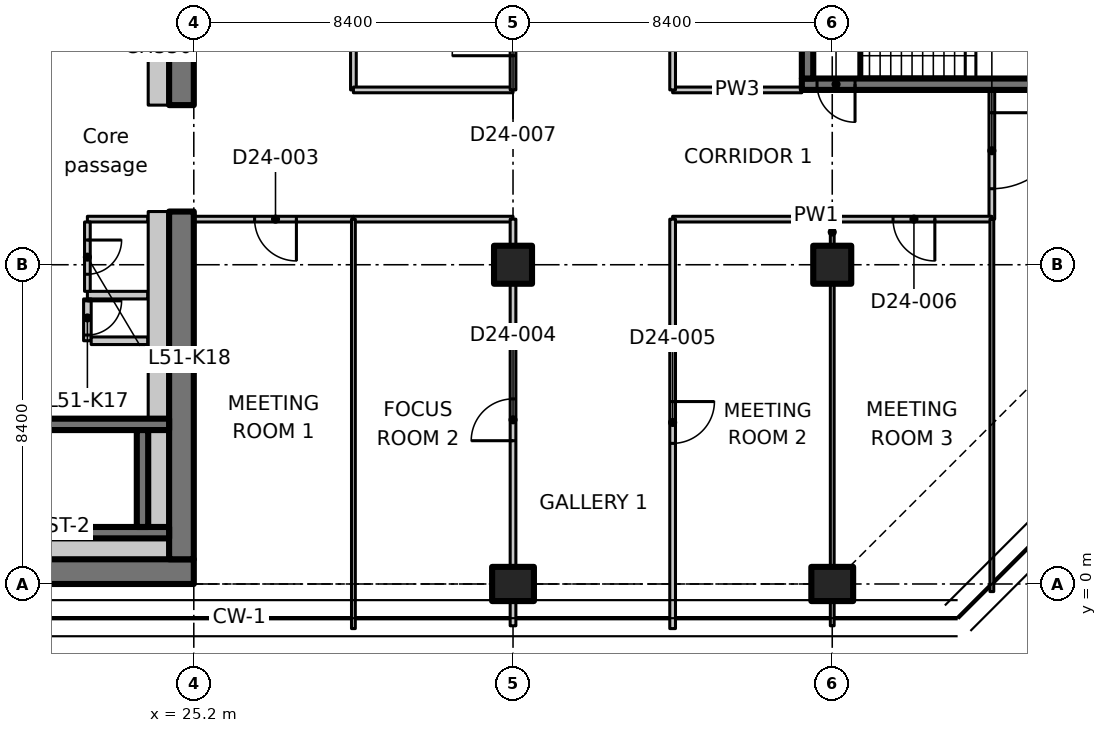
"""IFC4 building model, lengths in metres.
Left out: names, types, materials, properties, quantities, classifications, styles, units other than length and angle.
Written with IfcOpenShell. Run it as: python <this file> out.ifc"""

import sys

from ifc_helpers import new_model, si_unit, direction, frame, frame_2d, origin, origin_2d, place, context, subcontext, project, spatial, polyline, rectangle, outline, extrude, element, fill, save


model = new_model("IFC4")
c1 = context("Model", 3, precision=1e-05, world=origin(), true_north=direction((0.0, 1.0)))
c2 = subcontext(c1, "Body", "Model", "MODEL_VIEW")
j1 = project(units=[si_unit("LENGTHUNIT", "METRE"), si_unit("PLANEANGLEUNIT", "RADIAN")], contexts=[c1])
p1 = place(None, origin())
s1 = spatial("IfcSite", under=j1, at=p1, CompositionType="ELEMENT")
p2 = place(p1, origin())
s2 = spatial("IfcBuilding", under=s1, at=p2, CompositionType="ELEMENT")
p3 = place(p2, frame((0.0, 0.0, 202.8)))
s3 = spatial("IfcBuildingStorey", under=s2, at=p3, CompositionType="ELEMENT", Elevation=202.8)
p4 = place(p3, frame((33.6, 0.0, 0.0), z_axis=(0.0, 0.0, 1.0), x_axis=(0.0, 1.0, 0.0)))
e1 = element("IfcColumn", 1, at=p4, inside=s3, PredefinedType="COLUMN", context=c2, shape_type="SweptSolid", body=[
    extrude(rectangle(XDim=0.9, YDim=1.1, at=origin_2d()), origin(), (0.0, 0.0, 1.0), 3.3),
])
p5 = place(p3, frame((33.6, 8.4, 0.0), z_axis=(0.0, 0.0, 1.0), x_axis=(1.0, 0.0, 0.0)))
e2 = element("IfcColumn", 2, at=p5, inside=s3, PredefinedType="COLUMN", context=c2, shape_type="SweptSolid", body=[
    extrude(rectangle(XDim=1.0, YDim=1.0, at=origin_2d()), origin(), (0.0, 0.0, 1.0), 3.3),
])
p6 = place(p3, frame((42.0, 0.0, 0.0), z_axis=(0.0, 0.0, 1.0), x_axis=(0.0, 1.0, 0.0)))
e3 = element("IfcColumn", 3, at=p6, inside=s3, PredefinedType="COLUMN", context=c2, shape_type="SweptSolid", body=[
    extrude(rectangle(XDim=0.9, YDim=1.1, at=origin_2d()), origin(), (0.0, 0.0, 1.0), 3.3),
])
p7 = place(p3, frame((42.0, 8.4, 0.0), z_axis=(0.0, 0.0, 1.0), x_axis=(1.0, 0.0, 0.0)))
e4 = element("IfcColumn", 4, at=p7, inside=s3, PredefinedType="COLUMN", context=c2, shape_type="SweptSolid", body=[
    extrude(rectangle(XDim=1.0, YDim=1.0, at=origin_2d()), origin(), (0.0, 0.0, 1.0), 3.3),
])
p8 = place(p3, frame((7.286, 0.325, 0.0), z_axis=(0.0, 0.0, 1.0), x_axis=(1.0, 0.0, 0.0)))
e5 = element("IfcWall", 5, at=p8, inside=s3, PredefinedType="SHEAR", context=c2, shape_type="SweptSolid", body=[
    extrude(rectangle(XDim=17.914, YDim=0.65, at=frame_2d((8.957, 0.0))), origin(), (0.0, 0.0, 1.0), 3.3),
])
p9 = place(p3, frame((24.875, 0.65, 0.0), z_axis=(0.0, 0.0, 1.0), x_axis=(0.0, 1.0, 0.0)))
e6 = element("IfcWall", 6, at=p9, inside=s3, PredefinedType="SHEAR", context=c2, shape_type="SweptSolid", body=[
    extrude(rectangle(XDim=9.15, YDim=0.65, at=frame_2d((4.575, 0.0))), origin(), (0.0, 0.0, 1.0), 3.3),
])
p10 = place(p3, frame((24.875, 12.6, 0.0), z_axis=(0.0, 0.0, 1.0), x_axis=(0.0, 1.0, 0.0)))
e7 = element("IfcWall", 7, at=p10, inside=s3, PredefinedType="SHEAR", context=c2, shape_type="SweptSolid", body=[
    extrude(rectangle(XDim=3.55, YDim=0.65, at=frame_2d((1.775, 0.0))), origin(), (0.0, 0.0, 1.0), 3.3),
])
p11 = place(p3, frame((24.275, 12.6, 0.0), z_axis=(0.0, 0.0, 1.0), x_axis=(0.0, 1.0, 0.0)))
e8 = element("IfcWall", 8, at=p11, inside=s3, PredefinedType="PARTITIONING", context=c2, shape_type="SweptSolid", body=[
    extrude(rectangle(XDim=3.0, YDim=0.55, at=frame_2d((1.5, 0.0))), origin(), (0.0, 0.0, 1.0), 3.3),
])
p12 = place(p3, frame((15.8, 1.35, 0.0), z_axis=(0.0, 0.0, 1.0), x_axis=(1.0, 0.0, 0.0)))
e9 = element("IfcWall", 9, at=p12, inside=s3, PredefinedType="SHEAR", context=c2, shape_type="SweptSolid", body=[
    extrude(rectangle(XDim=8.75, YDim=0.3, at=frame_2d((4.375, 0.0))), origin(), (0.0, 0.0, 1.0), 3.3),
])
p13 = place(p3, frame((15.8, 4.2, 0.0), z_axis=(0.0, 0.0, 1.0), x_axis=(1.0, 0.0, 0.0)))
e10 = element("IfcWall", 10, at=p13, inside=s3, PredefinedType="SHEAR", context=c2, shape_type="SweptSolid", body=[
    extrude(rectangle(XDim=8.75, YDim=0.3, at=frame_2d((4.375, 0.0))), origin(), (0.0, 0.0, 1.0), 3.3),
])
p14 = place(p13, frame((0.4, 0.0, 0.0)))
e11 = element("IfcOpeningElement", 11, at=p14, cuts=e10, PredefinedType="OPENING", context=c2, shape_type="SweptSolid", body=[
    extrude(rectangle(XDim=1.0, YDim=2.1, at=frame_2d((0.5, 1.05))), frame((0.0, 0.16, 0.0), z_axis=(0.0, -1.0, 0.0), x_axis=(1.0, 0.0, 0.0)), (0.0, 0.0, 1.0), 0.32),
])
p15 = place(p3, frame((23.85, 1.5, 0.0), z_axis=(0.0, 0.0, 1.0), x_axis=(0.0, 1.0, 0.0)))
e12 = element("IfcWall", 12, at=p15, inside=s3, PredefinedType="SHEAR", context=c2, shape_type="SweptSolid", body=[
    extrude(rectangle(XDim=2.55, YDim=0.3, at=frame_2d((1.275, 0.0))), origin(), (0.0, 0.0, 1.0), 3.3),
])
p16 = place(p3, frame((49.4, 13.15, 0.0), z_axis=(0.0, 0.0, 1.0), x_axis=(-1.0, 0.0, 0.0)))
e13 = element("IfcWall", 13, at=p16, inside=s3, PredefinedType="SHEAR", context=c2, shape_type="SweptSolid", body=[
    extrude(rectangle(XDim=8.2, YDim=0.3, at=frame_2d((4.1, 0.0))), origin(), (0.0, 0.0, 1.0), 3.3),
])
p17 = place(p16, frame((6.8, 0.0, 0.0)))
e14 = element("IfcOpeningElement", 14, at=p17, cuts=e13, PredefinedType="OPENING", context=c2, shape_type="SweptSolid", body=[
    extrude(rectangle(XDim=1.0, YDim=2.1, at=frame_2d((0.5, 1.05))), frame((0.0, 0.16, 0.0), z_axis=(0.0, -1.0, 0.0), x_axis=(1.0, 0.0, 0.0)), (0.0, 0.0, 1.0), 0.32),
])
p18 = place(p3, frame((41.35, 13.3, 0.0), z_axis=(0.0, 0.0, 1.0), x_axis=(0.0, 1.0, 0.0)))
e15 = element("IfcWall", 15, at=p18, inside=s3, PredefinedType="SHEAR", context=c2, shape_type="SweptSolid", body=[
    extrude(rectangle(XDim=2.55, YDim=0.3, at=frame_2d((1.275, 0.0))), origin(), (0.0, 0.0, 1.0), 3.3),
])
p19 = place(p3, frame((23.988, 7.6, 0.0), z_axis=(0.0, 0.0, 1.0), x_axis=(-1.0, 0.0, 0.0)))
e16 = element("IfcWall", 16, at=p19, inside=s3, PredefinedType="PARTITIONING", context=c2, shape_type="SweptSolid", body=[
    extrude(rectangle(XDim=1.588, YDim=0.2, at=frame_2d((0.794, 0.0))), origin(), (0.0, 0.0, 1.0), 3.3),
])
p20 = place(p3, frame((22.4, 7.5, 0.0), z_axis=(0.0, 0.0, 1.0), x_axis=(0.0, -1.0, 0.0)))
e17 = element("IfcWall", 17, at=p20, inside=s3, PredefinedType="PARTITIONING", context=c2, shape_type="SweptSolid", body=[
    extrude(rectangle(XDim=1.1, YDim=0.2, at=frame_2d((0.55, 0.0))), origin(), (0.0, 0.0, 1.0), 3.3),
])
p21 = place(p20, frame((0.05, 0.0, 0.0)))
e18 = element("IfcOpeningElement", 18, at=p21, cuts=e17, PredefinedType="OPENING", context=c2, shape_type="SweptSolid", body=[
    extrude(rectangle(XDim=0.9, YDim=2.1, at=frame_2d((0.45, 1.05))), frame((0.0, 0.11, 0.0), z_axis=(0.0, -1.0, 0.0), x_axis=(1.0, 0.0, 0.0)), (0.0, 0.0, 1.0), 0.22),
])
p22 = place(p3, frame((22.5, 6.4, 0.0), z_axis=(0.0, 0.0, 1.0), x_axis=(1.0, 0.0, 0.0)))
e19 = element("IfcWall", 19, at=p22, inside=s3, PredefinedType="PARTITIONING", context=c2, shape_type="SweptSolid", body=[
    extrude(rectangle(XDim=1.488, YDim=0.2, at=frame_2d((0.744, 0.0))), origin(), (0.0, 0.0, 1.0), 3.3),
])
p23 = place(p3, frame((23.988, 9.6, 0.0), z_axis=(0.0, 0.0, 1.0), x_axis=(-1.0, 0.0, 0.0)))
e20 = element("IfcWall", 20, at=p23, inside=s3, PredefinedType="PARTITIONING", context=c2, shape_type="SweptSolid", body=[
    extrude(rectangle(XDim=1.588, YDim=0.15, at=frame_2d((0.794, 0.0))), origin(), (0.0, 0.0, 1.0), 3.3),
])
p24 = place(p3, frame((22.4, 9.525, 0.0), z_axis=(0.0, 0.0, 1.0), x_axis=(0.0, -1.0, 0.0)))
e21 = element("IfcWall", 21, at=p24, inside=s3, PredefinedType="PARTITIONING", context=c2, shape_type="SweptSolid", body=[
    extrude(rectangle(XDim=1.825, YDim=0.15, at=frame_2d((0.913, 0.0))), origin(), (0.0, 0.0, 1.0), 3.3),
])
p25 = place(p24, frame((0.475, 0.0, 0.0)))
e22 = element("IfcOpeningElement", 22, at=p25, cuts=e21, PredefinedType="OPENING", context=c2, shape_type="SweptSolid", body=[
    extrude(rectangle(XDim=0.9, YDim=2.1, at=frame_2d((0.45, 1.05))), frame((0.0, 0.085, 0.0), z_axis=(0.0, -1.0, 0.0), x_axis=(1.0, 0.0, 0.0)), (0.0, 0.0, 1.0), 0.17),
])
p26 = place(p3, frame((13.35, 0.925, 0.0), z_axis=(0.0, 0.0, 1.0), x_axis=(1.0, 0.0, 0.0)))
e23 = element("IfcWall", 23, at=p26, inside=s3, PredefinedType="PARTITIONING", context=c2, shape_type="SweptSolid", body=[
    extrude(rectangle(XDim=11.2, YDim=0.55, at=frame_2d((5.6, 0.0))), origin(), (0.0, 0.0, 1.0), 3.3),
])
p27 = place(p3, frame((24.275, 1.5, 0.0), z_axis=(0.0, 0.0, 1.0), x_axis=(0.0, 1.0, 0.0)))
e24 = element("IfcWall", 24, at=p27, inside=s3, PredefinedType="PARTITIONING", context=c2, shape_type="SweptSolid", body=[
    extrude(rectangle(XDim=2.55, YDim=0.55, at=frame_2d((1.275, 0.0))), origin(), (0.0, 0.0, 1.0), 3.3),
])
p28 = place(p3, frame((24.275, 4.35, 0.0), z_axis=(0.0, 0.0, 1.0), x_axis=(0.0, 1.0, 0.0)))
e25 = element("IfcWall", 25, at=p28, inside=s3, PredefinedType="PARTITIONING", context=c2, shape_type="SweptSolid", body=[
    extrude(rectangle(XDim=5.45, YDim=0.55, at=frame_2d((2.725, 0.0))), origin(), (0.0, 0.0, 1.0), 3.3),
])
p29 = place(p3, frame((29.4, 9.6, 0.0), z_axis=(0.0, 0.0, 1.0), x_axis=(-1.0, 0.0, 0.0)))
e26 = element("IfcWall", 26, at=p29, inside=s3, PredefinedType="PARTITIONING", context=c2, shape_type="SweptSolid", body=[
    extrude(rectangle(XDim=4.2, YDim=0.15, at=frame_2d((2.1, 0.0))), origin(), (0.0, 0.0, 1.0), 3.28),
])
p30 = place(p29, frame((1.5, 0.0, 0.0)))
e27 = element("IfcOpeningElement", 27, at=p30, cuts=e26, PredefinedType="OPENING", context=c2, shape_type="SweptSolid", body=[
    extrude(rectangle(XDim=1.1, YDim=2.1, at=frame_2d((0.55, 1.05))), frame((0.0, 0.085, 0.0), z_axis=(0.0, -1.0, 0.0), x_axis=(1.0, 0.0, 0.0)), (0.0, 0.0, 1.0), 0.17),
])
p31 = place(p3, frame((29.4, 21.2, 0.0), z_axis=(0.0, 0.0, 1.0), x_axis=(0.0, -1.0, 0.0)))
e28 = element("IfcWall", 28, at=p31, inside=s3, PredefinedType="PARTITIONING", context=c2, shape_type="SweptSolid", body=[
    extrude(rectangle(XDim=8.2, YDim=0.15, at=frame_2d((4.1, 0.0))), origin(), (0.0, 0.0, 1.0), 3.28),
])
p32 = place(p3, frame((46.2, 13.0, 0.0), z_axis=(0.0, 0.0, 1.0), x_axis=(0.0, -1.0, 0.0)))
e29 = element("IfcWall", 29, at=p32, inside=s3, PredefinedType="PARTITIONING", context=c2, shape_type="SweptSolid", body=[
    extrude(rectangle(XDim=3.4, YDim=0.15, at=frame_2d((1.7, 0.0))), origin(), (0.0, 0.0, 1.0), 3.28),
])
p33 = place(p32, frame((0.6, 0.0, 0.0)))
e30 = element("IfcOpeningElement", 30, at=p33, cuts=e29, PredefinedType="OPENING", context=c2, shape_type="SweptSolid", body=[
    extrude(rectangle(XDim=2.0, YDim=2.4, at=frame_2d((1.0, 1.2))), frame((0.0, 0.085, 0.0), z_axis=(0.0, -1.0, 0.0), x_axis=(1.0, 0.0, 0.0)), (0.0, 0.0, 1.0), 0.17),
])
p34 = place(p3, frame((33.6, 9.6, 0.0), z_axis=(0.0, 0.0, 1.0), x_axis=(-1.0, 0.0, 0.0)))
e31 = element("IfcWall", 31, at=p34, inside=s3, PredefinedType="PARTITIONING", context=c2, shape_type="SweptSolid", body=[
    extrude(rectangle(XDim=4.2, YDim=0.15, at=frame_2d((2.1, 0.0))), origin(), (0.0, 0.0, 1.0), 3.28),
])
p35 = place(p3, frame((42.0, 9.6, 0.0), z_axis=(0.0, 0.0, 1.0), x_axis=(-1.0, 0.0, 0.0)))
e32 = element("IfcWall", 32, at=p35, inside=s3, PredefinedType="PARTITIONING", context=c2, shape_type="SweptSolid", body=[
    extrude(rectangle(XDim=4.2, YDim=0.15, at=frame_2d((2.1, 0.0))), origin(), (0.0, 0.0, 1.0), 3.28),
])
p36 = place(p3, frame((46.2, 9.6, 0.0), z_axis=(0.0, 0.0, 1.0), x_axis=(-1.0, 0.0, 0.0)))
e33 = element("IfcWall", 33, at=p36, inside=s3, PredefinedType="PARTITIONING", context=c2, shape_type="SweptSolid", body=[
    extrude(rectangle(XDim=4.2, YDim=0.15, at=frame_2d((2.1, 0.0))), origin(), (0.0, 0.0, 1.0), 3.28),
])
p37 = place(p36, frame((1.5, 0.0, 0.0)))
e34 = element("IfcOpeningElement", 34, at=p37, cuts=e33, PredefinedType="OPENING", context=c2, shape_type="SweptSolid", body=[
    extrude(rectangle(XDim=1.1, YDim=2.1, at=frame_2d((0.55, 1.05))), frame((0.0, 0.085, 0.0), z_axis=(0.0, -1.0, 0.0), x_axis=(1.0, 0.0, 0.0)), (0.0, 0.0, 1.0), 0.17),
])
p38 = place(p3, frame((29.4, 13.0, 0.0), z_axis=(0.0, 0.0, 1.0), x_axis=(1.0, 0.0, 0.0)))
e35 = element("IfcWall", 35, at=p38, inside=s3, PredefinedType="PARTITIONING", context=c2, shape_type="SweptSolid", body=[
    extrude(rectangle(XDim=4.2, YDim=0.15, at=frame_2d((2.1, 0.0))), origin(), (0.0, 0.0, 1.0), 3.28),
])
p39 = place(p3, frame((37.8, 13.0, 0.0), z_axis=(0.0, 0.0, 1.0), x_axis=(1.0, 0.0, 0.0)))
e36 = element("IfcWall", 36, at=p39, inside=s3, PredefinedType="PARTITIONING", context=c2, shape_type="SweptSolid", body=[
    extrude(rectangle(XDim=3.4, YDim=0.15, at=frame_2d((1.7, 0.0))), origin(), (0.0, 0.0, 1.0), 3.28),
])
p40 = place(p3, frame((46.2, -0.2, 0.0), z_axis=(0.0, 0.0, 1.0), x_axis=(0.0, 1.0, 0.0)))
e37 = element("IfcWall", 37, at=p40, inside=s3, PredefinedType="PARTITIONING", context=c2, shape_type="SweptSolid", body=[
    extrude(outline(polyline([(0.0, 0.0), (9.8, 0.0), (9.8, 3.28), (5.066, 3.28), (5.064, 2.93), (3.736, 2.93), (3.734, 3.28), (0.0, 3.28), (0.0, 0.0)])), frame((0.0, 0.05, 0.0), z_axis=(0.0, -1.0, 0.0), x_axis=(1.0, 0.0, 0.0)), (0.0, 0.0, 1.0), 0.1),
])
p41 = place(p3, frame((33.6, -1.1, 0.0), z_axis=(0.0, 0.0, 1.0), x_axis=(0.0, 1.0, 0.0)))
e38 = element("IfcWall", 38, at=p41, inside=s3, PredefinedType="PARTITIONING", context=c2, shape_type="SweptSolid", body=[
    extrude(rectangle(XDim=0.63, YDim=0.15, at=frame_2d((0.315, 0.0))), origin(), (0.0, 0.0, 1.0), 3.28),
])
p42 = place(p3, frame((33.6, 0.47, 0.0), z_axis=(0.0, 0.0, 1.0), x_axis=(0.0, 1.0, 0.0)))
e39 = element("IfcWall", 39, at=p42, inside=s3, PredefinedType="PARTITIONING", context=c2, shape_type="SweptSolid", body=[
    extrude(rectangle(XDim=7.41, YDim=0.15, at=frame_2d((3.705, 0.0))), origin(), (0.0, 0.0, 1.0), 3.28),
])
p43 = place(p42, frame((3.3, 0.0, 0.0)))
e40 = element("IfcOpeningElement", 40, at=p43, cuts=e39, PredefinedType="OPENING", context=c2, shape_type="SweptSolid", body=[
    extrude(rectangle(XDim=1.1, YDim=2.1, at=frame_2d((0.55, 1.05))), frame((0.0, 0.085, 0.0), z_axis=(0.0, -1.0, 0.0), x_axis=(1.0, 0.0, 0.0)), (0.0, 0.0, 1.0), 0.17),
])
p44 = place(p3, frame((33.6, 8.92, 0.0), z_axis=(0.0, 0.0, 1.0), x_axis=(0.0, 1.0, 0.0)))
e41 = element("IfcWall", 41, at=p44, inside=s3, PredefinedType="PARTITIONING", context=c2, shape_type="SweptSolid", body=[
    extrude(rectangle(XDim=0.68, YDim=0.15, at=frame_2d((0.34, 0.0))), origin(), (0.0, 0.0, 1.0), 3.28),
])
p45 = place(p3, frame((37.8, 9.6, 0.0), z_axis=(0.0, 0.0, 1.0), x_axis=(0.0, -1.0, 0.0)))
e42 = element("IfcWall", 42, at=p45, inside=s3, PredefinedType="PARTITIONING", context=c2, shape_type="SweptSolid", body=[
    extrude(outline(polyline([(0.0, 0.0), (10.774, 0.0), (10.774, 3.28), (10.7, 3.28), (10.05, 3.28), (10.048, 2.93), (9.152, 2.93), (9.15, 3.28), (0.0, 3.28), (0.0, 0.0)])), frame((0.0, 0.075, 0.0), z_axis=(0.0, -1.0, 0.0), x_axis=(1.0, 0.0, 0.0)), (0.0, 0.0, 1.0), 0.15),
])
p46 = place(p45, frame((4.8, 0.0, 0.0)))
e43 = element("IfcOpeningElement", 43, at=p46, cuts=e42, PredefinedType="OPENING", context=c2, shape_type="SweptSolid", body=[
    extrude(rectangle(XDim=1.1, YDim=2.1, at=frame_2d((0.55, 1.05))), frame((0.0, 0.085, 0.0), z_axis=(0.0, -1.0, 0.0), x_axis=(1.0, 0.0, 0.0)), (0.0, 0.0, 1.0), 0.17),
])
p47 = place(p3, frame((29.4, 9.6, 0.0), z_axis=(0.0, 0.0, 1.0), x_axis=(0.0, -1.0, 0.0)))
e44 = element("IfcWall", 44, at=p47, inside=s3, PredefinedType="PARTITIONING", context=c2, shape_type="SweptSolid", body=[
    extrude(outline(polyline([(0.0, 0.0), (10.774, 0.0), (10.774, 3.28), (10.7, 3.28), (10.05, 3.28), (10.048, 2.93), (9.152, 2.93), (9.15, 3.28), (0.0, 3.28), (0.0, 0.0)])), frame((0.0, 0.05, 0.0), z_axis=(0.0, -1.0, 0.0), x_axis=(1.0, 0.0, 0.0)), (0.0, 0.0, 1.0), 0.1),
])
p48 = place(p3, frame((42.0, 9.6, 0.0), z_axis=(0.0, 0.0, 1.0), x_axis=(0.0, -1.0, 0.0)))
e45 = element("IfcWall", 45, at=p48, inside=s3, PredefinedType="PARTITIONING", context=c2, shape_type="SweptSolid", body=[
    extrude(rectangle(XDim=0.68, YDim=0.1, at=frame_2d((0.34, 0.0))), origin(), (0.0, 0.0, 1.0), 3.28),
])
p49 = place(p3, frame((42.0, 7.88, 0.0), z_axis=(0.0, 0.0, 1.0), x_axis=(0.0, -1.0, 0.0)))
e46 = element("IfcWall", 46, at=p49, inside=s3, PredefinedType="PARTITIONING", context=c2, shape_type="SweptSolid", body=[
    extrude(outline(polyline([(0.0, 0.0), (7.41, 0.0), (7.41, 2.93), (7.216, 2.93), (7.214, 3.28), (0.0, 3.28), (0.0, 0.0)])), frame((0.0, 0.05, 0.0), z_axis=(0.0, -1.0, 0.0), x_axis=(1.0, 0.0, 0.0)), (0.0, 0.0, 1.0), 0.1),
])
p50 = place(p3, frame((42.0, -0.47, 0.0), z_axis=(0.0, 0.0, 1.0), x_axis=(0.0, -1.0, 0.0)))
e47 = element("IfcWall", 47, at=p50, inside=s3, PredefinedType="PARTITIONING", context=c2, shape_type="SweptSolid", body=[
    extrude(rectangle(XDim=0.63, YDim=0.1, at=frame_2d((0.315, 0.0))), origin(), (0.0, 0.0, 1.0), 3.28),
])
p51 = place(p3, frame((33.6, 13.0, 0.0), z_axis=(0.0, 0.0, 1.0), x_axis=(0.0, 1.0, 0.0)))
e48 = element("IfcWall", 48, at=p51, inside=s3, PredefinedType="PARTITIONING", context=c2, shape_type="SweptSolid", body=[
    extrude(rectangle(XDim=3.28, YDim=0.15, at=frame_2d((1.64, 0.0))), origin(), (0.0, 0.0, 1.0), 3.28),
])
p52 = place(p51, frame((0.9, 0.0, 0.0)))
e49 = element("IfcOpeningElement", 49, at=p52, cuts=e48, PredefinedType="OPENING", context=c2, shape_type="SweptSolid", body=[
    extrude(rectangle(XDim=1.6, YDim=2.1, at=frame_2d((0.8, 1.05))), frame((0.0, 0.085, 0.0), z_axis=(0.0, -1.0, 0.0), x_axis=(1.0, 0.0, 0.0)), (0.0, 0.0, 1.0), 0.17),
])
p53 = place(p3, frame((37.8, 30.526, 0.0), z_axis=(0.0, 0.0, 1.0), x_axis=(0.0, -1.0, 0.0)))
e50 = element("IfcWall", 50, at=p53, inside=s3, PredefinedType="PARTITIONING", context=c2, shape_type="SweptSolid", body=[
    extrude(outline(polyline([(0.0, 0.0), (17.526, 0.0), (17.526, 3.28), (5.776, 3.28), (5.774, 2.93), (4.878, 2.93), (4.876, 3.28), (0.283, 3.28), (0.0, 3.28), (0.0, 0.0)])), frame((0.0, 0.075, 0.0), z_axis=(0.0, -1.0, 0.0), x_axis=(1.0, 0.0, 0.0)), (0.0, 0.0, 1.0), 0.15),
])
p54 = place(p53, frame((8.283, 0.0, 0.0)))
e51 = element("IfcOpeningElement", 51, at=p54, cuts=e50, PredefinedType="OPENING", context=c2, shape_type="SweptSolid", body=[
    extrude(rectangle(XDim=1.6, YDim=2.1, at=frame_2d((0.8, 1.05))), frame((0.0, 0.085, 0.0), z_axis=(0.0, -1.0, 0.0), x_axis=(1.0, 0.0, 0.0)), (0.0, 0.0, 1.0), 0.17),
])
p55 = place(p17, origin())
e52 = element("IfcDoor", 52, at=p55, inside=s3, OperationType="SINGLE_SWING_LEFT", PredefinedType="DOOR", context=c2, shape_type="SweptSolid", body=[
    extrude(rectangle(XDim=1.0, YDim=2.1, at=frame_2d((0.5, 1.05))), frame((0.0, 0.025, 0.0), z_axis=(0.0, -1.0, 0.0), x_axis=(1.0, 0.0, 0.0)), (0.0, 0.0, 1.0), 0.05),
])
fill(e14, e52)
p56 = place(p21, origin())
e53 = element("IfcDoor", 53, at=p56, inside=s3, OperationType="SINGLE_SWING_LEFT", PredefinedType="DOOR", context=c2, shape_type="SweptSolid", body=[
    extrude(rectangle(XDim=0.9, YDim=2.1, at=frame_2d((0.45, 1.05))), frame((0.0, 0.025, 0.0), z_axis=(0.0, -1.0, 0.0), x_axis=(1.0, 0.0, 0.0)), (0.0, 0.0, 1.0), 0.05),
])
fill(e18, e53)
p57 = place(p25, origin())
e54 = element("IfcDoor", 54, at=p57, inside=s3, OperationType="SINGLE_SWING_RIGHT", PredefinedType="DOOR", context=c2, shape_type="SweptSolid", body=[
    extrude(rectangle(XDim=0.9, YDim=2.1, at=frame_2d((0.45, 1.05))), frame((0.0, 0.025, 0.0), z_axis=(0.0, -1.0, 0.0), x_axis=(1.0, 0.0, 0.0)), (0.0, 0.0, 1.0), 0.05),
])
fill(e22, e54)
p58 = place(p33, origin())
e55 = element("IfcDoor", 55, at=p58, inside=s3, OperationType="DOUBLE_DOOR_SINGLE_SWING", PredefinedType="DOOR", context=c2, shape_type="SweptSolid", body=[
    extrude(rectangle(XDim=2.0, YDim=2.4, at=frame_2d((1.0, 1.2))), frame((0.0, 0.025, 0.0), z_axis=(0.0, -1.0, 0.0), x_axis=(1.0, 0.0, 0.0)), (0.0, 0.0, 1.0), 0.05),
])
fill(e30, e55)
p59 = place(p30, origin())
e56 = element("IfcDoor", 56, at=p59, inside=s3, OperationType="SINGLE_SWING_LEFT", PredefinedType="DOOR", context=c2, shape_type="SweptSolid", body=[
    extrude(rectangle(XDim=1.1, YDim=2.1, at=frame_2d((0.55, 1.05))), frame((0.0, 0.025, 0.0), z_axis=(0.0, -1.0, 0.0), x_axis=(1.0, 0.0, 0.0)), (0.0, 0.0, 1.0), 0.05),
])
fill(e27, e56)
p60 = place(p43, origin())
e57 = element("IfcDoor", 57, at=p60, inside=s3, OperationType="SINGLE_SWING_LEFT", PredefinedType="DOOR", context=c2, shape_type="SweptSolid", body=[
    extrude(rectangle(XDim=1.1, YDim=2.1, at=frame_2d((0.55, 1.05))), frame((0.0, 0.025, 0.0), z_axis=(0.0, -1.0, 0.0), x_axis=(1.0, 0.0, 0.0)), (0.0, 0.0, 1.0), 0.05),
])
fill(e40, e57)
p61 = place(p46, origin())
e58 = element("IfcDoor", 58, at=p61, inside=s3, OperationType="SINGLE_SWING_LEFT", PredefinedType="DOOR", context=c2, shape_type="SweptSolid", body=[
    extrude(rectangle(XDim=1.1, YDim=2.1, at=frame_2d((0.55, 1.05))), frame((0.0, 0.025, 0.0), z_axis=(0.0, -1.0, 0.0), x_axis=(1.0, 0.0, 0.0)), (0.0, 0.0, 1.0), 0.05),
])
fill(e43, e58)
p62 = place(p37, origin())
e59 = element("IfcDoor", 59, at=p62, inside=s3, OperationType="SINGLE_SWING_LEFT", PredefinedType="DOOR", context=c2, shape_type="SweptSolid", body=[
    extrude(rectangle(XDim=1.1, YDim=2.1, at=frame_2d((0.55, 1.05))), frame((0.0, 0.025, 0.0), z_axis=(0.0, -1.0, 0.0), x_axis=(1.0, 0.0, 0.0)), (0.0, 0.0, 1.0), 0.05),
])
fill(e34, e59)
p63 = place(p52, origin())
e60 = element("IfcDoor", 60, at=p63, inside=s3, OperationType="DOUBLE_DOOR_SINGLE_SWING", PredefinedType="DOOR", context=c2, shape_type="SweptSolid", body=[
    extrude(rectangle(XDim=1.6, YDim=2.1, at=frame_2d((0.8, 1.05))), frame((0.0, 0.025, 0.0), z_axis=(0.0, -1.0, 0.0), x_axis=(1.0, 0.0, 0.0)), (0.0, 0.0, 1.0), 0.05),
])
fill(e49, e60)
save(model, sys.argv[1])
